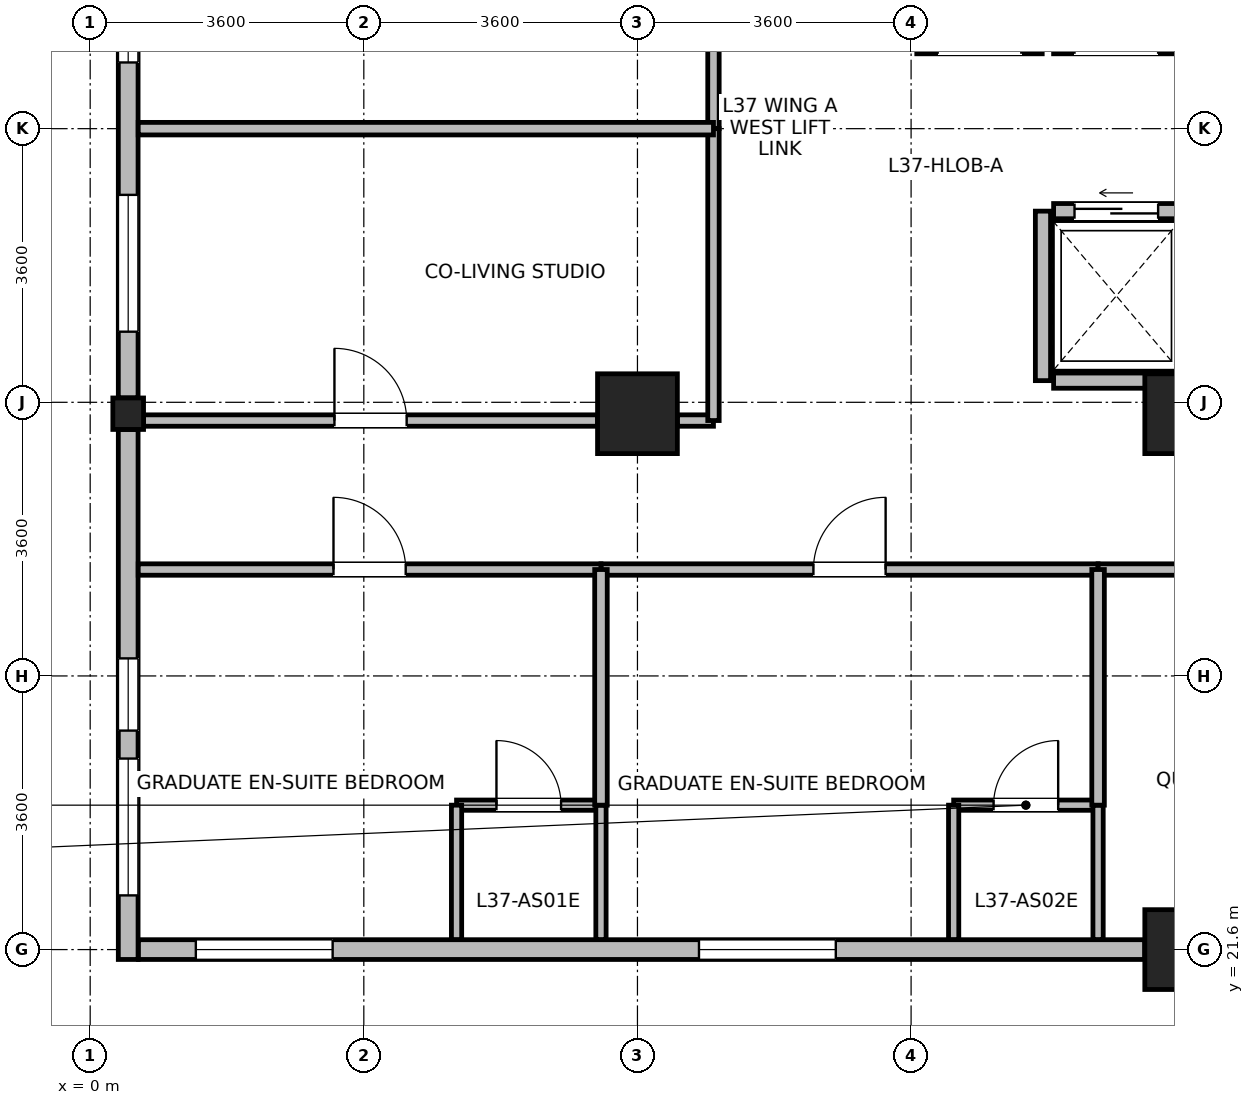
"""IFC4 building model, lengths in metres.
Left out: names, types, materials, properties, quantities, classifications, styles, units other than length and angle.
Written with IfcOpenShell. Run it as: python <this file> out.ifc"""

import sys

from ifc_helpers import new_model, si_unit, direction, frame, frame_2d, origin, origin_2d, place, context, subcontext, project, spatial, rectangle, i_section, extrude, source, transform, mapped, element, fill, save


model = new_model("IFC4")
c1 = context("Model", 3, precision=1e-05, world=origin(), true_north=direction((0.0, 1.0)))
c2 = subcontext(c1, "Body", "Model", "MODEL_VIEW")
j1 = project(units=[si_unit("LENGTHUNIT", "METRE"), si_unit("PLANEANGLEUNIT", "RADIAN")], contexts=[c1])
p1 = place(None, origin())
s1 = spatial("IfcSite", under=j1, at=p1, CompositionType="ELEMENT")
p2 = place(p1, origin())
s2 = spatial("IfcBuilding", under=s1, at=p2, CompositionType="ELEMENT")
p3 = place(p2, frame((0.0, 0.0, 147.6)))
s3 = spatial("IfcBuildingStorey", under=s2, at=p3, CompositionType="ELEMENT", Elevation=147.6)
m1 = source(origin(), c2, "Body", "SweptSolid", [
    extrude(rectangle(XDim=1.05, YDim=1.05, at=origin_2d()), origin(), (0.0, 0.0, 1.0), 3.7),
])
for number, where, z_axis, x_axis in (
    (1, (7.2, 28.65, 0.0), (0.0, 0.0, 1.0), (1.0, 0.0, 0.0)),
    (2, (14.4, 21.6, 0.0), (0.0, 0.0, 1.0), (1.0, 0.0, 0.0)),
    (3, (14.4, 28.65, 0.0), (0.0, 0.0, 1.0), (1.0, 0.0, 0.0)),
):
    element("IfcColumn", number, at=place(p3, frame(where, z_axis=z_axis, x_axis=x_axis)), inside=s3, PredefinedType="COLUMN", context=c2, shape_type="MappedRepresentation", body=[
        mapped(m1, transform((0.0, 0.0, 0.0), x_axis=(1.0, 0.0, 0.0), y_axis=(0.0, 1.0, 0.0), z_axis=(0.0, 0.0, 1.0), scale=1.0)),
    ])
m2 = source(origin(), c2, "Body", "SweptSolid", [
    extrude(i_section(OverallWidth=0.404, OverallDepth=0.414, WebThickness=0.021, FlangeThickness=0.028, FilletRadius=0.015, at=origin_2d()), origin(), (0.0, 0.0, 1.0), 3.7),
])
p4 = place(p3, frame((0.5, 28.65, 0.0), z_axis=(0.0, 0.0, 1.0), x_axis=(1.0, 0.0, 0.0)))
e4 = element("IfcColumn", 4, at=p4, inside=s3, PredefinedType="COLUMN", context=c2, shape_type="MappedRepresentation", body=[
    mapped(m2, transform((0.0, 0.0, 0.0), x_axis=(1.0, 0.0, 0.0), y_axis=(0.0, 1.0, 0.0), z_axis=(0.0, 0.0, 1.0), scale=1.0)),
])
p5 = place(p3, frame((0.5, 28.858, 0.0), z_axis=(0.0, 0.0, 1.0), x_axis=(0.0, 1.0, 0.0)))
e5 = element("IfcWall", 5, at=p5, inside=s3, PredefinedType="STANDARD", context=c2, shape_type="SweptSolid", body=[
    extrude(rectangle(XDim=7.084, YDim=0.26, at=frame_2d((3.542, 0.0))), origin(), (0.0, 0.0, 1.0), 2.99),
])
p6 = place(p5, frame((0.871, 0.0, 0.85)))
e6 = element("IfcOpeningElement", 6, at=p6, cuts=e5, PredefinedType="OPENING", context=c2, shape_type="SweptSolid", body=[
    extrude(rectangle(XDim=1.8, YDim=1.85, at=frame_2d((0.9, 0.925))), frame((0.0, 0.14, 0.0), z_axis=(0.0, -1.0, 0.0), x_axis=(1.0, 0.0, 0.0)), (0.0, 0.0, 1.0), 0.28),
])
p7 = place(p5, frame((4.413, 0.0, 0.85)))
e7 = element("IfcOpeningElement", 7, at=p7, cuts=e5, PredefinedType="OPENING", context=c2, shape_type="SweptSolid", body=[
    extrude(rectangle(XDim=1.8, YDim=1.85, at=frame_2d((0.9, 0.925))), frame((0.0, 0.14, 0.0), z_axis=(0.0, -1.0, 0.0), x_axis=(1.0, 0.0, 0.0)), (0.0, 0.0, 1.0), 0.28),
])
p8 = place(p3, frame((0.5, 21.47, 0.0), z_axis=(0.0, 0.0, 1.0), x_axis=(0.0, 1.0, 0.0)))
e8 = element("IfcWall", 8, at=p8, inside=s3, PredefinedType="STANDARD", context=c2, shape_type="SweptSolid", body=[
    extrude(rectangle(XDim=6.972, YDim=0.26, at=frame_2d((3.486, 0.0))), origin(), (0.0, 0.0, 1.0), 3.44),
])
p9 = place(p8, frame((0.843, 0.0, 0.85)))
e9 = element("IfcOpeningElement", 9, at=p9, cuts=e8, PredefinedType="OPENING", context=c2, shape_type="SweptSolid", body=[
    extrude(rectangle(XDim=1.8, YDim=1.85, at=frame_2d((0.9, 0.925))), frame((0.0, 0.14, 0.0), z_axis=(0.0, -1.0, 0.0), x_axis=(1.0, 0.0, 0.0)), (0.0, 0.0, 1.0), 0.28),
])
p10 = place(p8, frame((3.011, 0.0, 0.85)))
e10 = element("IfcOpeningElement", 10, at=p10, cuts=e8, PredefinedType="OPENING", context=c2, shape_type="SweptSolid", body=[
    extrude(rectangle(XDim=0.95, YDim=1.75, at=frame_2d((0.475, 0.875))), frame((0.0, 0.14, 0.0), z_axis=(0.0, -1.0, 0.0), x_axis=(1.0, 0.0, 0.0)), (0.0, 0.0, 1.0), 0.28),
])
p11 = place(p3, frame((13.874, 21.6, 0.0), z_axis=(0.0, 0.0, 1.0), x_axis=(-1.0, 0.0, 0.0)))
e11 = element("IfcWall", 11, at=p11, inside=s3, PredefinedType="STANDARD", context=c2, shape_type="SweptSolid", body=[
    extrude(rectangle(XDim=13.239, YDim=0.26, at=frame_2d((6.62, 0.0))), origin(), (0.0, 0.0, 1.0), 3.44),
])
p12 = place(p11, frame((4.065, 0.0, 0.85)))
e12 = element("IfcOpeningElement", 12, at=p12, cuts=e11, PredefinedType="OPENING", context=c2, shape_type="SweptSolid", body=[
    extrude(rectangle(XDim=1.8, YDim=1.85, at=frame_2d((0.9, 0.925))), frame((0.0, 0.14, 0.0), z_axis=(0.0, -1.0, 0.0), x_axis=(1.0, 0.0, 0.0)), (0.0, 0.0, 1.0), 0.28),
])
p13 = place(p11, frame((10.684, 0.0, 0.85)))
e13 = element("IfcOpeningElement", 13, at=p13, cuts=e11, PredefinedType="OPENING", context=c2, shape_type="SweptSolid", body=[
    extrude(rectangle(XDim=1.8, YDim=1.85, at=frame_2d((0.9, 0.925))), frame((0.0, 0.14, 0.0), z_axis=(0.0, -1.0, 0.0), x_axis=(1.0, 0.0, 0.0)), (0.0, 0.0, 1.0), 0.28),
])
p14 = place(p3, frame((12.675, 33.485, 0.0), z_axis=(0.0, 0.0, 1.0), x_axis=(1.0, 0.0, 0.0)))
e14 = element("IfcWall", 14, at=p14, inside=s3, PredefinedType="PARTITIONING", context=c2, shape_type="SweptSolid", body=[
    extrude(rectangle(XDim=1.65, YDim=0.2, at=frame_2d((0.825, 0.0))), origin(), (0.0, 0.0, 1.0), 3.44),
])
p15 = place(p14, frame((0.275, 0.0, 0.0)))
e15 = element("IfcOpeningElement", 15, at=p15, cuts=e14, PredefinedType="OPENING", context=c2, shape_type="SweptSolid", body=[
    extrude(rectangle(XDim=1.1, YDim=2.12, at=frame_2d((0.55, 1.06))), frame((0.0, 0.11, 0.0), z_axis=(0.0, -1.0, 0.0), x_axis=(1.0, 0.0, 0.0)), (0.0, 0.0, 1.0), 0.22),
])
p16 = place(p3, frame((12.675, 29.085, 0.0), z_axis=(0.0, 0.0, 1.0), x_axis=(1.0, 0.0, 0.0)))
e16 = element("IfcWall", 16, at=p16, inside=s3, PredefinedType="PARTITIONING", context=c2, shape_type="SweptSolid", body=[
    extrude(rectangle(XDim=1.65, YDim=0.2, at=frame_2d((0.825, 0.0))), origin(), (0.0, 0.0, 1.0), 3.44),
])
p17 = place(p3, frame((12.675, 31.315, 0.0), z_axis=(0.0, 0.0, 1.0), x_axis=(1.0, 0.0, 0.0)))
e17 = element("IfcWall", 17, at=p17, inside=s3, PredefinedType="PARTITIONING", context=c2, shape_type="SweptSolid", body=[
    extrude(rectangle(XDim=1.65, YDim=0.2, at=frame_2d((0.825, 0.0))), origin(), (0.0, 0.0, 1.0), 3.44),
])
p18 = place(p17, frame((0.275, 0.0, 0.0)))
e18 = element("IfcOpeningElement", 18, at=p18, cuts=e17, PredefinedType="OPENING", context=c2, shape_type="SweptSolid", body=[
    extrude(rectangle(XDim=1.1, YDim=2.12, at=frame_2d((0.55, 1.06))), frame((0.0, 0.11, 0.0), z_axis=(0.0, -1.0, 0.0), x_axis=(1.0, 0.0, 0.0)), (0.0, 0.0, 1.0), 0.22),
])
p19 = place(p3, frame((12.535, 29.085, 0.0), z_axis=(0.0, 0.0, 1.0), x_axis=(0.0, 1.0, 0.0)))
e19 = element("IfcWall", 19, at=p19, inside=s3, PredefinedType="PARTITIONING", context=c2, shape_type="SweptSolid", body=[
    extrude(rectangle(XDim=2.23, YDim=0.2, at=frame_2d((1.115, 0.0))), origin(), (0.0, 0.0, 1.0), 3.44),
])
p20 = place(p3, frame((10.875, 33.485, 0.0), z_axis=(0.0, 0.0, 1.0), x_axis=(1.0, 0.0, 0.0)))
e20 = element("IfcWall", 20, at=p20, inside=s3, PredefinedType="PARTITIONING", context=c2, shape_type="SweptSolid", body=[
    extrude(rectangle(XDim=1.65, YDim=0.2, at=frame_2d((0.825, 0.0))), origin(), (0.0, 0.0, 1.0), 3.44),
])
p21 = place(p20, frame((0.275, 0.0, 0.0)))
e21 = element("IfcOpeningElement", 21, at=p21, cuts=e20, PredefinedType="OPENING", context=c2, shape_type="SweptSolid", body=[
    extrude(rectangle(XDim=1.1, YDim=2.12, at=frame_2d((0.55, 1.06))), frame((0.0, 0.11, 0.0), z_axis=(0.0, -1.0, 0.0), x_axis=(1.0, 0.0, 0.0)), (0.0, 0.0, 1.0), 0.22),
])
p22 = place(p3, frame((11.36, 23.5, 0.0), z_axis=(0.0, 0.0, 1.0), x_axis=(1.0, 0.0, 0.0)))
e22 = element("IfcWall", 22, at=p22, inside=s3, PredefinedType="PARTITIONING", context=c2, shape_type="SweptSolid", body=[
    extrude(rectangle(XDim=1.9, YDim=0.135, at=frame_2d((0.95, 0.0))), origin(), (0.0, 0.0, 1.0), 3.44),
])
p23 = place(p22, frame((0.525, 0.0, 0.0)))
e23 = element("IfcOpeningElement", 23, at=p23, cuts=e22, PredefinedType="OPENING", context=c2, shape_type="SweptSolid", body=[
    extrude(rectangle(XDim=0.85, YDim=2.04, at=frame_2d((0.425, 1.02))), frame((0.0, 0.078, 0.0), z_axis=(0.0, -1.0, 0.0), x_axis=(1.0, 0.0, 0.0)), (0.0, 0.0, 1.0), 0.155),
])
p24 = place(p3, frame((4.82, 23.5, 0.0), z_axis=(0.0, 0.0, 1.0), x_axis=(1.0, 0.0, 0.0)))
e24 = element("IfcWall", 24, at=p24, inside=s3, PredefinedType="PARTITIONING", context=c2, shape_type="SweptSolid", body=[
    extrude(rectangle(XDim=1.9, YDim=0.135, at=frame_2d((0.95, 0.0))), origin(), (0.0, 0.0, 1.0), 3.44),
])
p25 = place(p24, frame((0.525, 0.0, 0.0)))
e25 = element("IfcOpeningElement", 25, at=p25, cuts=e24, PredefinedType="OPENING", context=c2, shape_type="SweptSolid", body=[
    extrude(rectangle(XDim=0.85, YDim=2.04, at=frame_2d((0.425, 1.02))), frame((0.0, 0.078, 0.0), z_axis=(0.0, -1.0, 0.0), x_axis=(1.0, 0.0, 0.0)), (0.0, 0.0, 1.0), 0.155),
])
for number, where, z_axis, x_axis in (
    (26, (4.82, 21.732, 0.0), (0.0, 0.0, 1.0), (0.0, 1.0, 0.0)),
    (27, (6.72, 21.732, 0.0), (0.0, 0.0, 1.0), (0.0, 1.0, 0.0)),
    (28, (11.36, 21.732, 0.0), (0.0, 0.0, 1.0), (0.0, 1.0, 0.0)),
    (29, (13.26, 21.732, 0.0), (0.0, 0.0, 1.0), (0.0, 1.0, 0.0)),
):
    element("IfcWall", number, at=place(p3, frame(where, z_axis=z_axis, x_axis=x_axis)), inside=s3, PredefinedType="PARTITIONING", context=c2, shape_type="SweptSolid", body=[
        extrude(rectangle(XDim=1.768, YDim=0.135, at=frame_2d((0.884, 0.0))), origin(), (0.0, 0.0, 1.0), 3.44),
    ])
p26 = place(p3, frame((0.702, 28.56, 0.0), z_axis=(0.0, 0.0, 1.0), x_axis=(1.0, 0.0, 0.0)))
e30 = element("IfcWall", 30, at=p26, inside=s3, PredefinedType="PARTITIONING", context=c2, shape_type="SweptSolid", body=[
    extrude(rectangle(XDim=5.973, YDim=0.15, at=frame_2d((2.987, 0.0))), origin(), (0.0, 0.0, 1.0), 2.84),
])
p27 = place(p26, frame((2.511, 0.0, 0.0)))
e31 = element("IfcOpeningElement", 31, at=p27, cuts=e30, PredefinedType="OPENING", context=c2, shape_type="SweptSolid", body=[
    extrude(rectangle(XDim=0.95, YDim=2.1, at=frame_2d((0.475, 1.05))), frame((0.0, 0.085, 0.0), z_axis=(0.0, -1.0, 0.0), x_axis=(1.0, 0.0, 0.0)), (0.0, 0.0, 1.0), 0.17),
])
p28 = place(p3, frame((7.725, 28.56, 0.0), z_axis=(0.0, 0.0, 1.0), x_axis=(1.0, 0.0, 0.0)))
e32 = element("IfcWall", 32, at=p28, inside=s3, PredefinedType="PARTITIONING", context=c2, shape_type="SweptSolid", body=[
    extrude(rectangle(XDim=0.475, YDim=0.15, at=frame_2d((0.237, 0.0))), origin(), (0.0, 0.0, 1.0), 2.84),
])
p29 = place(p3, frame((6.72, 26.6, 0.0), z_axis=(0.0, 0.0, 1.0), x_axis=(1.0, 0.0, 0.0)))
e33 = element("IfcWall", 33, at=p29, inside=s3, PredefinedType="PARTITIONING", context=c2, shape_type="SweptSolid", body=[
    extrude(rectangle(XDim=6.54, YDim=0.15, at=frame_2d((3.27, 0.0))), origin(), (0.0, 0.0, 1.0), 3.44),
])
p30 = place(p29, frame((2.795, 0.0, 0.0)))
e34 = element("IfcOpeningElement", 34, at=p30, cuts=e33, PredefinedType="OPENING", context=c2, shape_type="SweptSolid", body=[
    extrude(rectangle(XDim=0.95, YDim=2.1, at=frame_2d((0.475, 1.05))), frame((0.0, 0.085, 0.0), z_axis=(0.0, -1.0, 0.0), x_axis=(1.0, 0.0, 0.0)), (0.0, 0.0, 1.0), 0.17),
])
p31 = place(p3, frame((0.632, 26.6, 0.0), z_axis=(0.0, 0.0, 1.0), x_axis=(1.0, 0.0, 0.0)))
e35 = element("IfcWall", 35, at=p31, inside=s3, PredefinedType="PARTITIONING", context=c2, shape_type="SweptSolid", body=[
    extrude(rectangle(XDim=6.088, YDim=0.15, at=frame_2d((3.044, 0.0))), origin(), (0.0, 0.0, 1.0), 3.44),
])
p32 = place(p31, frame((2.569, 0.0, 0.0)))
e36 = element("IfcOpeningElement", 36, at=p32, cuts=e35, PredefinedType="OPENING", context=c2, shape_type="SweptSolid", body=[
    extrude(rectangle(XDim=0.95, YDim=2.1, at=frame_2d((0.475, 1.05))), frame((0.0, 0.085, 0.0), z_axis=(0.0, -1.0, 0.0), x_axis=(1.0, 0.0, 0.0)), (0.0, 0.0, 1.0), 0.17),
])
p33 = place(p3, frame((13.26, 26.6, 0.0), z_axis=(0.0, 0.0, 1.0), x_axis=(1.0, 0.0, 0.0)))
e37 = element("IfcWall", 37, at=p33, inside=s3, PredefinedType="PARTITIONING", context=c2, shape_type="SweptSolid", body=[
    extrude(rectangle(XDim=5.96, YDim=0.15, at=frame_2d((2.98, 0.0))), origin(), (0.0, 0.0, 1.0), 3.44),
])
p34 = place(p33, frame((2.33, 0.0, 0.0)))
e38 = element("IfcOpeningElement", 38, at=p34, cuts=e37, PredefinedType="OPENING", context=c2, shape_type="SweptSolid", body=[
    extrude(rectangle(XDim=1.3, YDim=2.12, at=frame_2d((0.65, 1.06))), frame((0.0, 0.085, 0.0), z_axis=(0.0, -1.0, 0.0), x_axis=(1.0, 0.0, 0.0)), (0.0, 0.0, 1.0), 0.17),
])
p35 = place(p3, frame((8.2, 32.4, 0.0), z_axis=(0.0, 0.0, 1.0), x_axis=(0.0, 1.0, 0.0)))
e39 = element("IfcWall", 39, at=p35, inside=s3, PredefinedType="PARTITIONING", context=c2, shape_type="SweptSolid", body=[
    extrude(rectangle(XDim=3.84, YDim=0.15, at=frame_2d((1.92, 0.0))), origin(), (0.0, 0.0, 1.0), 3.44),
])
p36 = place(p3, frame((8.2, 28.56, 0.0), z_axis=(0.0, 0.0, 1.0), x_axis=(0.0, 1.0, 0.0)))
e40 = element("IfcWall", 40, at=p36, inside=s3, PredefinedType="PARTITIONING", context=c2, shape_type="SweptSolid", body=[
    extrude(rectangle(XDim=3.84, YDim=0.15, at=frame_2d((1.92, 0.0))), origin(), (0.0, 0.0, 1.0), 3.44),
])
p37 = place(p3, frame((0.632, 32.4, 0.0), z_axis=(0.0, 0.0, 1.0), x_axis=(1.0, 0.0, 0.0)))
e41 = element("IfcWall", 41, at=p37, inside=s3, PredefinedType="PARTITIONING", context=c2, shape_type="SweptSolid", body=[
    extrude(rectangle(XDim=7.568, YDim=0.165, at=frame_2d((3.784, 0.0))), origin(), (0.0, 0.0, 1.0), 3.44),
])
for number, where, z_axis, x_axis in (
    (42, (6.72, 23.5, 0.0), (0.0, 0.0, 1.0), (0.0, 1.0, 0.0)),
    (43, (13.26, 23.5, 0.0), (0.0, 0.0, 1.0), (0.0, 1.0, 0.0)),
):
    element("IfcWall", number, at=place(p3, frame(where, z_axis=z_axis, x_axis=x_axis)), inside=s3, PredefinedType="PARTITIONING", context=c2, shape_type="SweptSolid", body=[
        extrude(rectangle(XDim=3.1, YDim=0.165, at=frame_2d((1.55, 0.0))), origin(), (0.0, 0.0, 1.0), 3.44),
    ])
p38 = place(p6, origin())
e44 = element("IfcWindow", 44, at=p38, inside=s3, PartitioningType="SINGLE_PANEL", PredefinedType="WINDOW", context=c2, shape_type="SweptSolid", body=[
    extrude(rectangle(XDim=1.8, YDim=1.85, at=frame_2d((0.9, 0.925))), frame((0.0, 0.03, 0.0), z_axis=(0.0, -1.0, 0.0), x_axis=(1.0, 0.0, 0.0)), (0.0, 0.0, 1.0), 0.06),
])
fill(e6, e44)
p39 = place(p7, origin())
e45 = element("IfcWindow", 45, at=p39, inside=s3, PartitioningType="SINGLE_PANEL", PredefinedType="WINDOW", context=c2, shape_type="SweptSolid", body=[
    extrude(rectangle(XDim=1.8, YDim=1.85, at=frame_2d((0.9, 0.925))), frame((0.0, 0.03, 0.0), z_axis=(0.0, -1.0, 0.0), x_axis=(1.0, 0.0, 0.0)), (0.0, 0.0, 1.0), 0.06),
])
fill(e7, e45)
p40 = place(p9, origin())
e46 = element("IfcWindow", 46, at=p40, inside=s3, PartitioningType="SINGLE_PANEL", PredefinedType="WINDOW", context=c2, shape_type="SweptSolid", body=[
    extrude(rectangle(XDim=1.8, YDim=1.85, at=frame_2d((0.9, 0.925))), frame((0.0, 0.03, 0.0), z_axis=(0.0, -1.0, 0.0), x_axis=(1.0, 0.0, 0.0)), (0.0, 0.0, 1.0), 0.06),
])
fill(e9, e46)
p41 = place(p10, origin())
e47 = element("IfcWindow", 47, at=p41, inside=s3, PartitioningType="SINGLE_PANEL", PredefinedType="WINDOW", context=c2, shape_type="SweptSolid", body=[
    extrude(rectangle(XDim=0.95, YDim=1.75, at=frame_2d((0.475, 0.875))), frame((0.0, 0.03, 0.0), z_axis=(0.0, -1.0, 0.0), x_axis=(1.0, 0.0, 0.0)), (0.0, 0.0, 1.0), 0.06),
])
fill(e10, e47)
p42 = place(p12, origin())
e48 = element("IfcWindow", 48, at=p42, inside=s3, PartitioningType="SINGLE_PANEL", PredefinedType="WINDOW", context=c2, shape_type="SweptSolid", body=[
    extrude(rectangle(XDim=1.8, YDim=1.85, at=frame_2d((0.9, 0.925))), frame((0.0, 0.03, 0.0), z_axis=(0.0, -1.0, 0.0), x_axis=(1.0, 0.0, 0.0)), (0.0, 0.0, 1.0), 0.06),
])
fill(e12, e48)
p43 = place(p13, origin())
e49 = element("IfcWindow", 49, at=p43, inside=s3, PartitioningType="SINGLE_PANEL", PredefinedType="WINDOW", context=c2, shape_type="SweptSolid", body=[
    extrude(rectangle(XDim=1.8, YDim=1.85, at=frame_2d((0.9, 0.925))), frame((0.0, 0.03, 0.0), z_axis=(0.0, -1.0, 0.0), x_axis=(1.0, 0.0, 0.0)), (0.0, 0.0, 1.0), 0.06),
])
fill(e13, e49)
p44 = place(p18, origin())
e50 = element("IfcDoor", 50, at=p44, inside=s3, OperationType="SLIDING_TO_LEFT", PredefinedType="DOOR", context=c2, shape_type="SweptSolid", body=[
    extrude(rectangle(XDim=1.1, YDim=2.12, at=frame_2d((0.55, 1.06))), frame((0.0, 0.025, 0.0), z_axis=(0.0, -1.0, 0.0), x_axis=(1.0, 0.0, 0.0)), (0.0, 0.0, 1.0), 0.05),
])
fill(e18, e50)
p45 = place(p23, origin())
e51 = element("IfcDoor", 51, at=p45, inside=s3, OperationType="SINGLE_SWING_RIGHT", PredefinedType="DOOR", context=c2, shape_type="SweptSolid", body=[
    extrude(rectangle(XDim=0.85, YDim=2.04, at=frame_2d((0.425, 1.02))), frame((0.0, 0.025, 0.0), z_axis=(0.0, -1.0, 0.0), x_axis=(1.0, 0.0, 0.0)), (0.0, 0.0, 1.0), 0.05),
])
fill(e23, e51)
p46 = place(p25, origin())
e52 = element("IfcDoor", 52, at=p46, inside=s3, OperationType="SINGLE_SWING_LEFT", PredefinedType="DOOR", context=c2, shape_type="SweptSolid", body=[
    extrude(rectangle(XDim=0.85, YDim=2.04, at=frame_2d((0.425, 1.02))), frame((0.0, 0.025, 0.0), z_axis=(0.0, -1.0, 0.0), x_axis=(1.0, 0.0, 0.0)), (0.0, 0.0, 1.0), 0.05),
])
fill(e25, e52)
p47 = place(p27, origin())
e53 = element("IfcDoor", 53, at=p47, inside=s3, OperationType="SINGLE_SWING_LEFT", PredefinedType="DOOR", context=c2, shape_type="SweptSolid", body=[
    extrude(rectangle(XDim=0.95, YDim=2.1, at=frame_2d((0.475, 1.05))), frame((0.0, 0.025, 0.0), z_axis=(0.0, -1.0, 0.0), x_axis=(1.0, 0.0, 0.0)), (0.0, 0.0, 1.0), 0.05),
])
fill(e31, e53)
p48 = place(p30, origin())
e54 = element("IfcDoor", 54, at=p48, inside=s3, OperationType="SINGLE_SWING_RIGHT", PredefinedType="DOOR", context=c2, shape_type="SweptSolid", body=[
    extrude(rectangle(XDim=0.95, YDim=2.1, at=frame_2d((0.475, 1.05))), frame((0.0, 0.025, 0.0), z_axis=(0.0, -1.0, 0.0), x_axis=(1.0, 0.0, 0.0)), (0.0, 0.0, 1.0), 0.05),
])
fill(e34, e54)
p49 = place(p32, origin())
e55 = element("IfcDoor", 55, at=p49, inside=s3, OperationType="SINGLE_SWING_LEFT", PredefinedType="DOOR", context=c2, shape_type="SweptSolid", body=[
    extrude(rectangle(XDim=0.95, YDim=2.1, at=frame_2d((0.475, 1.05))), frame((0.0, 0.025, 0.0), z_axis=(0.0, -1.0, 0.0), x_axis=(1.0, 0.0, 0.0)), (0.0, 0.0, 1.0), 0.05),
])
fill(e36, e55)
save(model, sys.argv[1])
